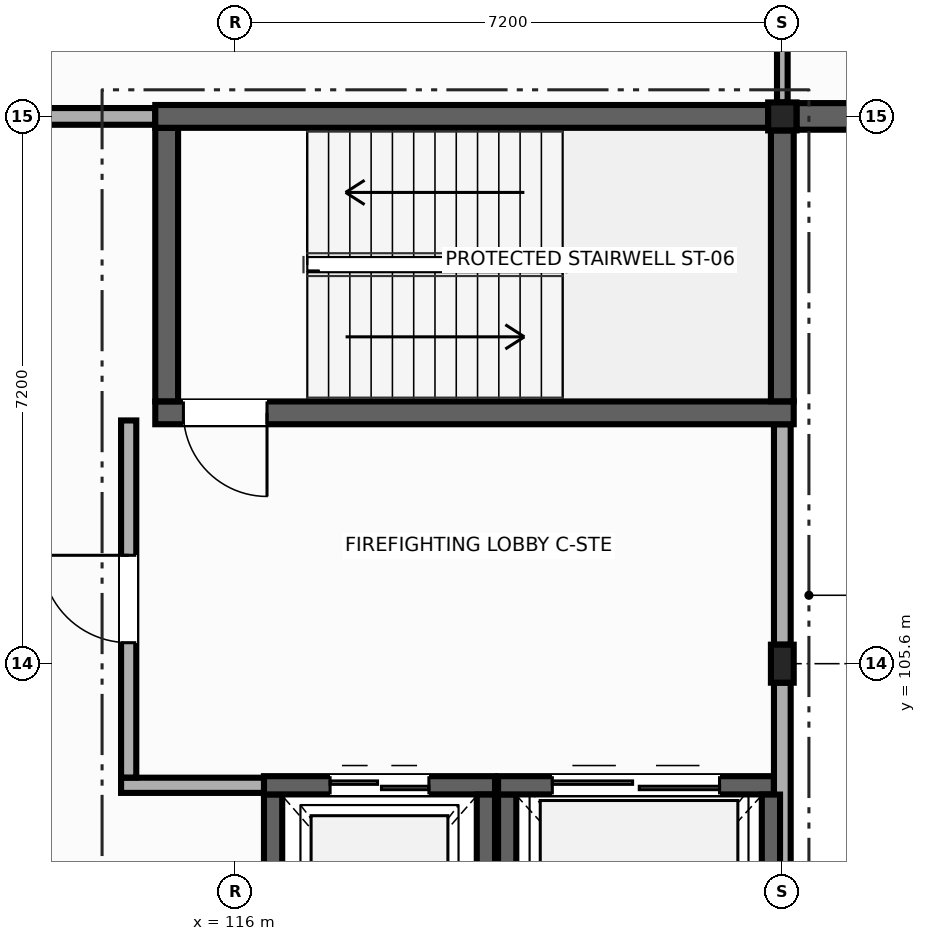
"""IFC4 building model, lengths in metres.
Left out: names, types, materials, properties, quantities, classifications, styles, units other than length and angle.
Written with IfcOpenShell. Run it as: python <this file> out.ifc"""

import sys

from ifc_helpers import new_model, si_unit, direction, frame, frame_2d, origin, origin_2d, place, context, subcontext, project, spatial, rectangle, i_section, extrude, element, fill, save


model = new_model("IFC4")
c1 = context("Model", 3, precision=1e-05, world=origin(), true_north=direction((0.0, 1.0)))
c2 = subcontext(c1, "Body", "Model", "MODEL_VIEW")
j1 = project(units=[si_unit("LENGTHUNIT", "METRE"), si_unit("PLANEANGLEUNIT", "RADIAN")], contexts=[c1])
p1 = place(None, origin())
s1 = spatial("IfcSite", under=j1, at=p1, CompositionType="ELEMENT")
p2 = place(p1, origin())
s2 = spatial("IfcBuilding", under=s1, at=p2, CompositionType="ELEMENT")
p3 = place(p2, frame((0.0, 0.0, 9.9)))
s3 = spatial("IfcBuildingStorey", under=s2, at=p3, CompositionType="ELEMENT", Elevation=9.9)
p4 = place(p3, frame((123.2, 105.6, 0.0), z_axis=(0.0, 0.0, 1.0), x_axis=(1.0, 0.0, 0.0)))
e1 = element("IfcColumn", 1, at=p4, inside=s3, PredefinedType="COLUMN", context=c2, shape_type="SweptSolid", body=[
    extrude(i_section(OverallWidth=0.3, OverallDepth=0.5, WebThickness=0.014, FlangeThickness=0.028, at=origin_2d()), origin(), (0.0, 0.0, 1.0), 4.5),
])
p5 = place(p3, frame((123.2, 112.8, 0.0), z_axis=(0.0, 0.0, 1.0), x_axis=(1.0, 0.0, 0.0)))
e2 = element("IfcColumn", 2, at=p5, inside=s3, PredefinedType="COLUMN", context=c2, shape_type="SweptSolid", body=[
    extrude(i_section(OverallWidth=0.373, OverallDepth=0.368, WebThickness=0.014, FlangeThickness=0.024, at=origin_2d()), origin(), (0.0, 0.0, 1.0), 4.5),
])
p6 = place(p3, frame((109.05, 112.8, 0.0), z_axis=(0.0, 0.0, 1.0), x_axis=(1.0, 0.0, 0.0)))
e3 = element("IfcWall", 3, at=p6, inside=s3, PredefinedType="SOLIDWALL", context=c2, shape_type="SweptSolid", body=[
    extrude(rectangle(XDim=5.9, YDim=0.22, at=frame_2d((2.95, 0.0))), origin(), (0.0, 0.0, 1.0), 4.22),
])
p7 = place(p6, frame((2.85, 0.0, 0.0)))
e4 = element("IfcOpeningElement", 4, at=p7, cuts=e3, PredefinedType="OPENING", context=c2, shape_type="SweptSolid", body=[
    extrude(rectangle(XDim=1.1, YDim=2.15, at=frame_2d((0.55, 1.075))), frame((0.0, 0.12, 0.0), z_axis=(0.0, -1.0, 0.0), x_axis=(1.0, 0.0, 0.0)), (0.0, 0.0, 1.0), 0.24),
])
p8 = place(p3, frame((123.2, 108.75, 0.0), z_axis=(0.0, 0.0, 1.0), x_axis=(0.0, -1.0, 0.0)))
e5 = element("IfcWall", 5, at=p8, inside=s3, PredefinedType="SOLIDWALL", context=c2, shape_type="SweptSolid", body=[
    extrude(rectangle(XDim=2.9, YDim=0.22, at=frame_2d((1.45, 0.0))), origin(), (0.0, 0.0, 1.0), 3.615),
])
p9 = place(p3, frame((123.2, 105.35, 0.0), z_axis=(0.0, 0.0, 1.0), x_axis=(0.0, -1.0, 0.0)))
e6 = element("IfcWall", 6, at=p9, inside=s3, PredefinedType="SOLIDWALL", context=c2, shape_type="SweptSolid", body=[
    extrude(rectangle(XDim=6.8, YDim=0.22, at=frame_2d((3.4, 0.0))), origin(), (0.0, 0.0, 1.0), 3.655),
])
p10 = place(p3, frame((130.1, 112.8, 0.0), z_axis=(0.0, 0.0, 1.0), x_axis=(-1.0, 0.0, 0.0)))
e7 = element("IfcWall", 7, at=p10, inside=s3, PredefinedType="SOLIDWALL", context=c2, shape_type="SweptSolid", body=[
    extrude(rectangle(XDim=6.714, YDim=0.35, at=frame_2d((3.357, 0.0))), origin(), (0.0, 0.0, 1.0), 4.22),
])
p11 = place(p10, frame((1.857, 0.0, 0.85)))
e8 = element("IfcOpeningElement", 8, at=p11, cuts=e7, PredefinedType="OPENING", context=c2, shape_type="SweptSolid", body=[
    extrude(rectangle(XDim=3.0, YDim=1.2, at=frame_2d((1.5, 0.6))), frame((0.0, 0.185, 0.0), z_axis=(0.0, -1.0, 0.0), x_axis=(1.0, 0.0, 0.0)), (0.0, 0.0, 1.0), 0.37),
])
p12 = place(p3, frame((123.35, 108.9, 0.0), z_axis=(0.0, 0.0, 1.0), x_axis=(-1.0, 0.0, 0.0)))
e9 = element("IfcWall", 9, at=p12, inside=s3, PredefinedType="SHEAR", context=c2, shape_type="SweptSolid", body=[
    extrude(rectangle(XDim=8.4, YDim=0.3, at=frame_2d((4.2, 0.0))), origin(), (0.0, 0.0, 1.0), 4.26),
])
p13 = place(p12, frame((6.93, 0.0, 0.0)))
e10 = element("IfcOpeningElement", 10, at=p13, cuts=e9, PredefinedType="OPENING", context=c2, shape_type="SweptSolid", body=[
    extrude(rectangle(XDim=1.1, YDim=2.15, at=frame_2d((0.55, 1.075))), frame((0.0, 0.16, 0.0), z_axis=(0.0, -1.0, 0.0), x_axis=(1.0, 0.0, 0.0)), (0.0, 0.0, 1.0), 0.32),
])
p14 = place(p3, frame((115.1, 109.052, 0.0), z_axis=(0.0, 0.0, 1.0), x_axis=(0.0, 1.0, 0.0)))
e11 = element("IfcWall", 11, at=p14, inside=s3, PredefinedType="SHEAR", context=c2, shape_type="SweptSolid", body=[
    extrude(rectangle(XDim=3.598, YDim=0.3, at=frame_2d((1.799, 0.0))), origin(), (0.0, 0.0, 1.0), 4.26),
])
p15 = place(p3, frame((114.95, 112.8, 0.0), z_axis=(0.0, 0.0, 1.0), x_axis=(1.0, 0.0, 0.0)))
e12 = element("IfcWall", 12, at=p15, inside=s3, PredefinedType="SHEAR", context=c2, shape_type="SweptSolid", body=[
    extrude(rectangle(XDim=8.064, YDim=0.3, at=frame_2d((4.032, 0.0))), origin(), (0.0, 0.0, 1.0), 4.22),
])
p16 = place(p3, frame((123.2, 112.616, 0.0), z_axis=(0.0, 0.0, 1.0), x_axis=(0.0, -1.0, 0.0)))
e13 = element("IfcWall", 13, at=p16, inside=s3, PredefinedType="SHEAR", context=c2, shape_type="SweptSolid", body=[
    extrude(rectangle(XDim=3.564, YDim=0.3, at=frame_2d((1.782, 0.0))), origin(), (0.0, 0.0, 1.0), 4.26),
])
p17 = place(p3, frame((116.5, 100.922, 0.0), z_axis=(0.0, 0.0, 1.0), x_axis=(0.0, 1.0, 0.0)))
e14 = element("IfcWall", 14, at=p17, inside=s3, PredefinedType="SHEAR", context=c2, shape_type="SweptSolid", body=[
    extrude(rectangle(XDim=2.958, YDim=0.24, at=frame_2d((1.479, 0.0))), origin(), (0.0, 0.0, 1.0), 4.26),
])
p18 = place(p3, frame((116.38, 104.0, 0.0), z_axis=(0.0, 0.0, 1.0), x_axis=(1.0, 0.0, 0.0)))
e15 = element("IfcWall", 15, at=p18, inside=s3, PredefinedType="SHEAR", context=c2, shape_type="SweptSolid", body=[
    extrude(rectangle(XDim=3.04, YDim=0.24, at=frame_2d((1.52, 0.0))), origin(), (0.0, 0.0, 1.0), 4.26),
])
p19 = place(p18, frame((0.87, 0.0, 0.0)))
e16 = element("IfcOpeningElement", 16, at=p19, cuts=e15, PredefinedType="OPENING", context=c2, shape_type="SweptSolid", body=[
    extrude(rectangle(XDim=1.3, YDim=2.15, at=frame_2d((0.65, 1.075))), frame((0.0, 0.13, 0.0), z_axis=(0.0, -1.0, 0.0), x_axis=(1.0, 0.0, 0.0)), (0.0, 0.0, 1.0), 0.26),
])
p20 = place(p3, frame((119.3, 103.878, 0.0), z_axis=(0.0, 0.0, 1.0), x_axis=(0.0, -1.0, 0.0)))
e17 = element("IfcWall", 17, at=p20, inside=s3, PredefinedType="SHEAR", context=c2, shape_type="SweptSolid", body=[
    extrude(rectangle(XDim=2.956, YDim=0.24, at=frame_2d((1.478, 0.0))), origin(), (0.0, 0.0, 1.0), 4.26),
])
p21 = place(p3, frame((119.58, 100.322, 0.0), z_axis=(0.0, 0.0, 1.0), x_axis=(0.0, 1.0, 0.0)))
e18 = element("IfcWall", 18, at=p21, inside=s3, PredefinedType="SHEAR", context=c2, shape_type="SweptSolid", body=[
    extrude(rectangle(XDim=3.558, YDim=0.24, at=frame_2d((1.779, 0.0))), origin(), (0.0, 0.0, 1.0), 4.26),
])
p22 = place(p3, frame((119.46, 104.0, 0.0), z_axis=(0.0, 0.0, 1.0), x_axis=(1.0, 0.0, 0.0)))
e19 = element("IfcWall", 19, at=p22, inside=s3, PredefinedType="SHEAR", context=c2, shape_type="SweptSolid", body=[
    extrude(rectangle(XDim=3.628, YDim=0.24, at=frame_2d((1.814, 0.0))), origin(), (0.0, 0.0, 1.0), 4.26),
])
p23 = place(p22, frame((0.714, 0.0, 0.0)))
e20 = element("IfcOpeningElement", 20, at=p23, cuts=e19, PredefinedType="OPENING", context=c2, shape_type="SweptSolid", body=[
    extrude(rectangle(XDim=2.2, YDim=2.5, at=frame_2d((1.1, 1.25))), frame((0.0, 0.13, 0.0), z_axis=(0.0, -1.0, 0.0), x_axis=(1.0, 0.0, 0.0)), (0.0, 0.0, 1.0), 0.26),
])
p24 = place(p3, frame((123.05, 103.878, 0.0), z_axis=(0.0, 0.0, 1.0), x_axis=(0.0, -1.0, 0.0)))
e21 = element("IfcWall", 21, at=p24, inside=s3, PredefinedType="SHEAR", context=c2, shape_type="SweptSolid", body=[
    extrude(rectangle(XDim=3.556, YDim=0.24, at=frame_2d((1.778, 0.0))), origin(), (0.0, 0.0, 1.0), 4.26),
])
p25 = place(p3, frame((116.38, 104.0, 0.0), z_axis=(0.0, 0.0, 1.0), x_axis=(-1.0, 0.0, 0.0)))
e22 = element("IfcWall", 22, at=p25, inside=s3, PredefinedType="PARTITIONING", context=c2, shape_type="SweptSolid", body=[
    extrude(rectangle(XDim=1.88, YDim=0.2, at=frame_2d((0.94, 0.0))), origin(), (0.0, 0.0, 1.0), 4.26),
])
p26 = place(p3, frame((114.6, 104.102, 0.0), z_axis=(0.0, 0.0, 1.0), x_axis=(0.0, 1.0, 0.0)))
e23 = element("IfcWall", 23, at=p26, inside=s3, PredefinedType="PARTITIONING", context=c2, shape_type="SweptSolid", body=[
    extrude(rectangle(XDim=4.698, YDim=0.2, at=frame_2d((2.349, 0.0))), origin(), (0.0, 0.0, 1.0), 4.26),
])
p27 = place(p26, frame((1.774, 0.0, 0.0)))
e24 = element("IfcOpeningElement", 24, at=p27, cuts=e23, PredefinedType="OPENING", context=c2, shape_type="SweptSolid", body=[
    extrude(rectangle(XDim=1.15, YDim=2.15, at=frame_2d((0.575, 1.075))), frame((0.0, 0.11, 0.0), z_axis=(0.0, -1.0, 0.0), x_axis=(1.0, 0.0, 0.0)), (0.0, 0.0, 1.0), 0.22),
])
p28 = place(p3, frame((123.2, 119.7, 0.0), z_axis=(0.0, 0.0, 1.0), x_axis=(0.0, -1.0, 0.0)))
e25 = element("IfcWall", 25, at=p28, inside=s3, PredefinedType="PARTITIONING", context=c2, shape_type="SweptSolid", body=[
    extrude(rectangle(XDim=6.716, YDim=0.14, at=frame_2d((3.358, 0.0))), origin(), (0.0, 0.0, 1.0), 3.515),
])
p29 = place(p13, origin())
e26 = element("IfcDoor", 26, at=p29, inside=s3, OperationType="SINGLE_SWING_LEFT", PredefinedType="DOOR", context=c2, shape_type="SweptSolid", body=[
    extrude(rectangle(XDim=1.1, YDim=2.15, at=frame_2d((0.55, 1.075))), frame((0.0, 0.025, 0.0), z_axis=(0.0, -1.0, 0.0), x_axis=(1.0, 0.0, 0.0)), (0.0, 0.0, 1.0), 0.05),
])
fill(e10, e26)
p30 = place(p19, origin())
e27 = element("IfcDoor", 27, at=p30, inside=s3, OperationType="DOUBLE_DOOR_SLIDING", PredefinedType="DOOR", context=c2, shape_type="SweptSolid", body=[
    extrude(rectangle(XDim=1.3, YDim=2.15, at=frame_2d((0.65, 1.075))), frame((0.0, 0.025, 0.0), z_axis=(0.0, -1.0, 0.0), x_axis=(1.0, 0.0, 0.0)), (0.0, 0.0, 1.0), 0.05),
])
fill(e16, e27)
p31 = place(p23, origin())
e28 = element("IfcDoor", 28, at=p31, inside=s3, OperationType="DOUBLE_DOOR_SLIDING", PredefinedType="DOOR", context=c2, shape_type="SweptSolid", body=[
    extrude(rectangle(XDim=2.2, YDim=2.5, at=frame_2d((1.1, 1.25))), frame((0.0, 0.025, 0.0), z_axis=(0.0, -1.0, 0.0), x_axis=(1.0, 0.0, 0.0)), (0.0, 0.0, 1.0), 0.05),
])
fill(e20, e28)
p32 = place(p27, origin())
e29 = element("IfcDoor", 29, at=p32, inside=s3, OperationType="SINGLE_SWING_RIGHT", PredefinedType="DOOR", context=c2, shape_type="SweptSolid", body=[
    extrude(rectangle(XDim=1.15, YDim=2.15, at=frame_2d((0.575, 1.075))), frame((0.0, 0.025, 0.0), z_axis=(0.0, -1.0, 0.0), x_axis=(1.0, 0.0, 0.0)), (0.0, 0.0, 1.0), 0.05),
])
fill(e24, e29)
save(model, sys.argv[1])
